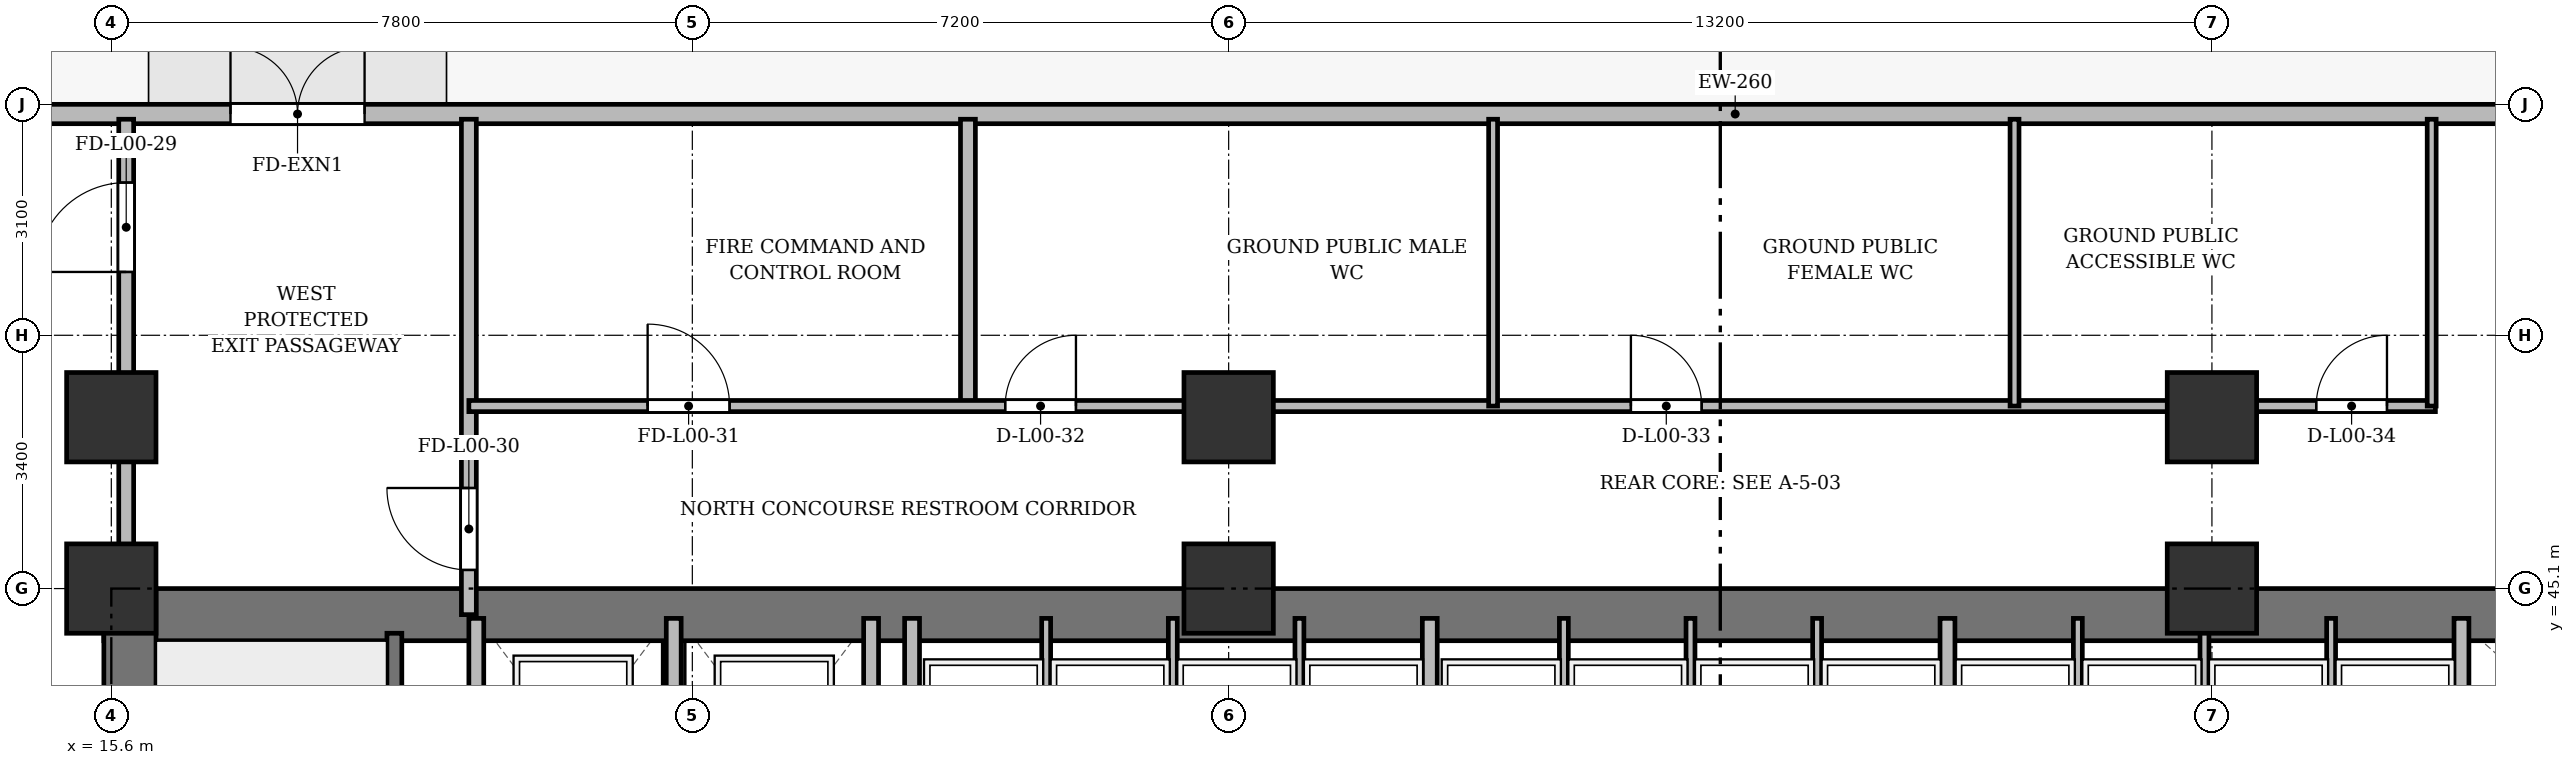
"""IFC4 building model, lengths in metres.
Left out: names, types, materials, properties, quantities, classifications, styles, units other than length and angle.
Written with IfcOpenShell. Run it as: python <this file> out.ifc"""

import sys

from ifc_helpers import new_model, si_unit, direction, frame, frame_2d, origin, origin_2d, place, context, subcontext, project, spatial, rectangle, extrude, source, transform, mapped, element, fill, save


model = new_model("IFC4")
c1 = context("Model", 3, precision=1e-05, world=origin(), true_north=direction((0.0, 1.0)))
c2 = subcontext(c1, "Body", "Model", "MODEL_VIEW")
j1 = project(units=[si_unit("LENGTHUNIT", "METRE"), si_unit("PLANEANGLEUNIT", "RADIAN")], contexts=[c1])
p1 = place(None, origin())
s1 = spatial("IfcSite", under=j1, at=p1, CompositionType="ELEMENT")
p2 = place(p1, origin())
s2 = spatial("IfcBuilding", under=s1, at=p2, CompositionType="ELEMENT")
p3 = place(p2, origin())
s3 = spatial("IfcBuildingStorey", under=s2, at=p3, CompositionType="ELEMENT", Elevation=0.0)
m1 = source(origin(), c2, "Body", "SweptSolid", [
    extrude(rectangle(XDim=1.2, YDim=1.2, at=origin_2d()), origin(), (0.0, 0.0, 1.0), 5.2),
])
for number, where, z_axis, x_axis in (
    (1, (15.6, 45.1, 0.0), (0.0, 0.0, 1.0), (1.0, 0.0, 0.0)),
    (2, (15.6, 47.4, 0.0), (0.0, 0.0, 1.0), (1.0, 0.0, 0.0)),
    (3, (30.6, 45.1, 0.0), (0.0, 0.0, 1.0), (1.0, 0.0, 0.0)),
    (4, (30.6, 47.4, 0.0), (0.0, 0.0, 1.0), (1.0, 0.0, 0.0)),
    (5, (43.8, 45.1, 0.0), (0.0, 0.0, 1.0), (1.0, 0.0, 0.0)),
    (6, (43.8, 47.4, 0.0), (0.0, 0.0, 1.0), (1.0, 0.0, 0.0)),
):
    element("IfcColumn", number, at=place(p3, frame(where, z_axis=z_axis, x_axis=x_axis)), inside=s3, PredefinedType="COLUMN", context=c2, shape_type="MappedRepresentation", body=[
        mapped(m1, transform((0.0, 0.0, 0.0), x_axis=(1.0, 0.0, 0.0), y_axis=(0.0, 1.0, 0.0), z_axis=(0.0, 0.0, 1.0), scale=1.0)),
    ])
p4 = place(p3, frame((-2.05, 51.47, 0.0), z_axis=(0.0, 0.0, 1.0), x_axis=(1.0, 0.0, 0.0)))
e7 = element("IfcWall", 7, at=p4, inside=s3, PredefinedType="SOLIDWALL", context=c2, shape_type="SweptSolid", body=[
    extrude(rectangle(XDim=78.5, YDim=0.26, at=frame_2d((39.25, 0.0))), origin(), (0.0, 0.0, 1.0), 4.88),
])
p5 = place(p4, frame((3.0, 0.0, 0.0)))
e8 = element("IfcOpeningElement", 8, at=p5, cuts=e7, PredefinedType="OPENING", context=c2, shape_type="SweptSolid", body=[
    extrude(rectangle(XDim=6.0, YDim=4.2, at=frame_2d((3.0, 2.1))), frame((0.0, 0.14, 0.0), z_axis=(0.0, -1.0, 0.0), x_axis=(1.0, 0.0, 0.0)), (0.0, 0.0, 1.0), 0.28),
])
p6 = place(p4, frame((19.25, 0.0, 0.0)))
e9 = element("IfcOpeningElement", 9, at=p6, cuts=e7, PredefinedType="OPENING", context=c2, shape_type="SweptSolid", body=[
    extrude(rectangle(XDim=1.8, YDim=2.3, at=frame_2d((0.9, 1.15))), frame((0.0, 0.14, 0.0), z_axis=(0.0, -1.0, 0.0), x_axis=(1.0, 0.0, 0.0)), (0.0, 0.0, 1.0), 0.28),
])
p7 = place(p4, frame((57.85, 0.0, 0.0)))
e10 = element("IfcOpeningElement", 10, at=p7, cuts=e7, PredefinedType="OPENING", context=c2, shape_type="SweptSolid", body=[
    extrude(rectangle(XDim=1.8, YDim=2.3, at=frame_2d((0.9, 1.15))), frame((0.0, 0.14, 0.0), z_axis=(0.0, -1.0, 0.0), x_axis=(1.0, 0.0, 0.0)), (0.0, 0.0, 1.0), 0.28),
])
p8 = place(p3, frame((15.5, 44.75, 0.0), z_axis=(0.0, 0.0, 1.0), x_axis=(1.0, 0.0, 0.0)))
e11 = element("IfcWall", 11, at=p8, inside=s3, PredefinedType="SHEAR", context=c2, shape_type="SweptSolid", body=[
    extrude(rectangle(XDim=43.4, YDim=0.7, at=frame_2d((21.7, 0.0))), origin(), (0.0, 0.0, 1.0), 4.88),
])
p9 = place(p3, frame((15.85, 33.4, 0.0), z_axis=(0.0, 0.0, 1.0), x_axis=(0.0, 1.0, 0.0)))
e12 = element("IfcWall", 12, at=p9, inside=s3, PredefinedType="SHEAR", context=c2, shape_type="SweptSolid", body=[
    extrude(rectangle(XDim=11.7, YDim=0.7, at=frame_2d((5.85, 0.0))), origin(), (0.0, 0.0, 1.0), 4.88),
])
p10 = place(p3, frame((19.4, 33.4, 0.0), z_axis=(0.0, 0.0, 1.0), x_axis=(0.0, 1.0, 0.0)))
e13 = element("IfcWall", 13, at=p10, inside=s3, PredefinedType="SHEAR", context=c2, shape_type="SweptSolid", body=[
    extrude(rectangle(XDim=11.1, YDim=0.2, at=frame_2d((5.55, 0.0))), origin(), (0.0, 0.0, 1.0), 4.88),
])
p11 = place(p10, frame((0.85, 0.0, 0.0)))
e14 = element("IfcOpeningElement", 14, at=p11, cuts=e13, PredefinedType="OPENING", context=c2, shape_type="SweptSolid", body=[
    extrude(rectangle(XDim=1.1, YDim=2.15, at=frame_2d((0.55, 1.075))), frame((0.0, 0.11, 0.0), z_axis=(0.0, -1.0, 0.0), x_axis=(1.0, 0.0, 0.0)), (0.0, 0.0, 1.0), 0.22),
])
for number, where, z_axis, x_axis in (
    (15, (20.5, 41.3, 0.0), (0.0, 0.0, 1.0), (0.0, 1.0, 0.0)),
    (16, (23.15, 41.3, 0.0), (0.0, 0.0, 1.0), (0.0, 1.0, 0.0)),
    (17, (25.8, 41.3, 0.0), (0.0, 0.0, 1.0), (0.0, 1.0, 0.0)),
):
    element("IfcWall", number, at=place(p3, frame(where, z_axis=z_axis, x_axis=x_axis)), inside=s3, PredefinedType="SOLIDWALL", context=c2, shape_type="SweptSolid", body=[
        extrude(rectangle(XDim=3.4, YDim=0.2, at=frame_2d((1.7, 0.0))), origin(), (0.0, 0.0, 1.0), 4.88),
    ])
p12 = place(p3, frame((26.35, 33.4, 0.0), z_axis=(0.0, 0.0, 1.0), x_axis=(0.0, 1.0, 0.0)))
e18 = element("IfcWall", 18, at=p12, inside=s3, PredefinedType="SOLIDWALL", context=c2, shape_type="SweptSolid", body=[
    extrude(rectangle(XDim=11.3, YDim=0.2, at=frame_2d((5.65, 0.0))), origin(), (0.0, 0.0, 1.0), 3.78),
])
p13 = place(p3, frame((33.3, 41.5, 0.0), z_axis=(0.0, 0.0, 1.0), x_axis=(0.0, 1.0, 0.0)))
e19 = element("IfcWall", 19, at=p13, inside=s3, PredefinedType="SOLIDWALL", context=c2, shape_type="SweptSolid", body=[
    extrude(rectangle(XDim=3.2, YDim=0.2, at=frame_2d((1.6, 0.0))), origin(), (0.0, 0.0, 1.0), 4.88),
])
for number, where, z_axis, x_axis in (
    (20, (28.15, 41.5, 0.0), (0.0, 0.0, 1.0), (0.0, 1.0, 0.0)),
    (21, (29.85, 41.5, 0.0), (0.0, 0.0, 1.0), (0.0, 1.0, 0.0)),
    (22, (31.55, 41.5, 0.0), (0.0, 0.0, 1.0), (0.0, 1.0, 0.0)),
    (23, (35.1, 41.5, 0.0), (0.0, 0.0, 1.0), (0.0, 1.0, 0.0)),
    (24, (36.8, 41.5, 0.0), (0.0, 0.0, 1.0), (0.0, 1.0, 0.0)),
    (25, (38.5, 41.5, 0.0), (0.0, 0.0, 1.0), (0.0, 1.0, 0.0)),
):
    element("IfcWall", number, at=place(p3, frame(where, z_axis=z_axis, x_axis=x_axis)), inside=s3, PredefinedType="PARTITIONING", context=c2, shape_type="SweptSolid", body=[
        extrude(rectangle(XDim=3.2, YDim=0.12, at=frame_2d((1.6, 0.0))), origin(), (0.0, 0.0, 1.0), 4.88),
    ])
p14 = place(p3, frame((40.25, 41.5, 0.0), z_axis=(0.0, 0.0, 1.0), x_axis=(0.0, 1.0, 0.0)))
e26 = element("IfcWall", 26, at=p14, inside=s3, PredefinedType="SOLIDWALL", context=c2, shape_type="SweptSolid", body=[
    extrude(rectangle(XDim=3.2, YDim=0.2, at=frame_2d((1.6, 0.0))), origin(), (0.0, 0.0, 1.0), 4.88),
])
p15 = place(p3, frame((42.0, 41.5, 0.0), z_axis=(0.0, 0.0, 1.0), x_axis=(0.0, 1.0, 0.0)))
e27 = element("IfcWall", 27, at=p15, inside=s3, PredefinedType="PARTITIONING", context=c2, shape_type="SweptSolid", body=[
    extrude(rectangle(XDim=3.2, YDim=0.12, at=frame_2d((1.6, 0.0))), origin(), (0.0, 0.0, 1.0), 4.88),
])
p16 = place(p3, frame((43.7, 41.5, 0.0), z_axis=(0.0, 0.0, 1.0), x_axis=(0.0, 1.0, 0.0)))
e28 = element("IfcWall", 28, at=p16, inside=s3, PredefinedType="PARTITIONING", context=c2, shape_type="SweptSolid", body=[
    extrude(rectangle(XDim=3.2, YDim=0.12, at=frame_2d((1.6, 0.0))), origin(), (0.0, 0.0, 1.0), 4.08),
])
p17 = place(p3, frame((45.4, 41.5, 0.0), z_axis=(0.0, 0.0, 1.0), x_axis=(0.0, 1.0, 0.0)))
e29 = element("IfcWall", 29, at=p17, inside=s3, PredefinedType="PARTITIONING", context=c2, shape_type="SweptSolid", body=[
    extrude(rectangle(XDim=3.2, YDim=0.12, at=frame_2d((1.6, 0.0))), origin(), (0.0, 0.0, 1.0), 4.88),
])
p18 = place(p3, frame((47.15, 33.4, 0.0), z_axis=(0.0, 0.0, 1.0), x_axis=(0.0, 1.0, 0.0)))
e30 = element("IfcWall", 30, at=p18, inside=s3, PredefinedType="SOLIDWALL", context=c2, shape_type="SweptSolid", body=[
    extrude(rectangle(XDim=11.3, YDim=0.2, at=frame_2d((5.65, 0.0))), origin(), (0.0, 0.0, 1.0), 3.78),
])
p19 = place(p3, frame((15.8, 44.75, 0.0), z_axis=(0.0, 0.0, 1.0), x_axis=(0.0, 1.0, 0.0)))
e31 = element("IfcWall", 31, at=p19, inside=s3, PredefinedType="PARTITIONING", context=c2, shape_type="SweptSolid", body=[
    extrude(rectangle(XDim=6.65, YDim=0.2, at=frame_2d((3.325, 0.0))), origin(), (0.0, 0.0, 1.0), 3.78),
])
p20 = place(p19, frame((4.6, 0.0, 0.0)))
e32 = element("IfcOpeningElement", 32, at=p20, cuts=e31, PredefinedType="OPENING", context=c2, shape_type="SweptSolid", body=[
    extrude(rectangle(XDim=1.2, YDim=2.15, at=frame_2d((0.6, 1.075))), frame((0.0, 0.11, 0.0), z_axis=(0.0, -1.0, 0.0), x_axis=(1.0, 0.0, 0.0)), (0.0, 0.0, 1.0), 0.22),
])
p21 = place(p3, frame((20.4, 44.75, 0.0), z_axis=(0.0, 0.0, 1.0), x_axis=(0.0, 1.0, 0.0)))
e33 = element("IfcWall", 33, at=p21, inside=s3, PredefinedType="PARTITIONING", context=c2, shape_type="SweptSolid", body=[
    extrude(rectangle(XDim=6.65, YDim=0.2, at=frame_2d((3.325, 0.0))), origin(), (0.0, 0.0, 1.0), 3.78),
])
p22 = place(p21, frame((0.6, 0.0, 0.0)))
e34 = element("IfcOpeningElement", 34, at=p22, cuts=e33, PredefinedType="OPENING", context=c2, shape_type="SweptSolid", body=[
    extrude(rectangle(XDim=1.1, YDim=2.15, at=frame_2d((0.55, 1.075))), frame((0.0, 0.11, 0.0), z_axis=(0.0, -1.0, 0.0), x_axis=(1.0, 0.0, 0.0)), (0.0, 0.0, 1.0), 0.22),
])
p23 = place(p3, frame((27.1, 47.55, 0.0), z_axis=(0.0, 0.0, 1.0), x_axis=(0.0, 1.0, 0.0)))
e35 = element("IfcWall", 35, at=p23, inside=s3, PredefinedType="PARTITIONING", context=c2, shape_type="SweptSolid", body=[
    extrude(rectangle(XDim=3.85, YDim=0.2, at=frame_2d((1.925, 0.0))), origin(), (0.0, 0.0, 1.0), 3.78),
])
p24 = place(p3, frame((20.4, 47.55, 0.0), z_axis=(0.0, 0.0, 1.0), x_axis=(1.0, 0.0, 0.0)))
e36 = element("IfcWall", 36, at=p24, inside=s3, PredefinedType="PARTITIONING", context=c2, shape_type="SweptSolid", body=[
    extrude(rectangle(XDim=26.4, YDim=0.15, at=frame_2d((13.2, 0.0))), origin(), (0.0, 0.0, 1.0), 3.78),
])
p25 = place(p24, frame((2.4, 0.0, 0.0)))
e37 = element("IfcOpeningElement", 37, at=p25, cuts=e36, PredefinedType="OPENING", context=c2, shape_type="SweptSolid", body=[
    extrude(rectangle(XDim=1.1, YDim=2.15, at=frame_2d((0.55, 1.075))), frame((0.0, 0.085, 0.0), z_axis=(0.0, -1.0, 0.0), x_axis=(1.0, 0.0, 0.0)), (0.0, 0.0, 1.0), 0.17),
])
p26 = place(p24, frame((7.2, 0.0, 0.0)))
e38 = element("IfcOpeningElement", 38, at=p26, cuts=e36, PredefinedType="OPENING", context=c2, shape_type="SweptSolid", body=[
    extrude(rectangle(XDim=0.95, YDim=2.15, at=frame_2d((0.475, 1.075))), frame((0.0, 0.085, 0.0), z_axis=(0.0, -1.0, 0.0), x_axis=(1.0, 0.0, 0.0)), (0.0, 0.0, 1.0), 0.17),
])
p27 = place(p24, frame((15.6, 0.0, 0.0)))
e39 = element("IfcOpeningElement", 39, at=p27, cuts=e36, PredefinedType="OPENING", context=c2, shape_type="SweptSolid", body=[
    extrude(rectangle(XDim=0.95, YDim=2.15, at=frame_2d((0.475, 1.075))), frame((0.0, 0.085, 0.0), z_axis=(0.0, -1.0, 0.0), x_axis=(1.0, 0.0, 0.0)), (0.0, 0.0, 1.0), 0.17),
])
p28 = place(p24, frame((24.8, 0.0, 0.0)))
e40 = element("IfcOpeningElement", 40, at=p28, cuts=e36, PredefinedType="OPENING", context=c2, shape_type="SweptSolid", body=[
    extrude(rectangle(XDim=0.95, YDim=2.15, at=frame_2d((0.475, 1.075))), frame((0.0, 0.085, 0.0), z_axis=(0.0, -1.0, 0.0), x_axis=(1.0, 0.0, 0.0)), (0.0, 0.0, 1.0), 0.17),
])
for number, where, z_axis, x_axis in (
    (41, (34.15, 47.55, 0.0), (0.0, 0.0, 1.0), (0.0, 1.0, 0.0)),
    (42, (41.15, 47.55, 0.0), (0.0, 0.0, 1.0), (0.0, 1.0, 0.0)),
    (43, (46.75, 47.55, 0.0), (0.0, 0.0, 1.0), (0.0, 1.0, 0.0)),
):
    element("IfcWall", number, at=place(p3, frame(where, z_axis=z_axis, x_axis=x_axis)), inside=s3, PredefinedType="PARTITIONING", context=c2, shape_type="SweptSolid", body=[
        extrude(rectangle(XDim=3.85, YDim=0.12, at=frame_2d((1.925, 0.0))), origin(), (0.0, 0.0, 1.0), 3.78),
    ])
m2 = source(origin(), c2, "Body", "SweptSolid", [
    extrude(rectangle(XDim=1.8, YDim=2.3, at=frame_2d((0.9, 1.15))), frame((0.0, 0.025, 0.0), z_axis=(0.0, -1.0, 0.0), x_axis=(1.0, 0.0, 0.0)), (0.0, 0.0, 1.0), 0.05),
])
p29 = place(p6, origin())
e44 = element("IfcDoor", 44, at=p29, inside=s3, OperationType="DOUBLE_DOOR_SINGLE_SWING", PredefinedType="DOOR", context=c2, shape_type="MappedRepresentation", body=[
    mapped(m2, transform((0.0, 0.0, 0.0), x_axis=(1.0, 0.0, 0.0), y_axis=(0.0, 1.0, 0.0), z_axis=(0.0, 0.0, 1.0), scale=1.0)),
])
fill(e9, e44)
m3 = source(origin(), c2, "Body", "SweptSolid", [
    extrude(rectangle(XDim=1.2, YDim=2.15, at=frame_2d((0.6, 1.075))), frame((0.0, 0.025, 0.0), z_axis=(0.0, -1.0, 0.0), x_axis=(1.0, 0.0, 0.0)), (0.0, 0.0, 1.0), 0.05),
])
p30 = place(p20, origin())
e45 = element("IfcDoor", 45, at=p30, inside=s3, OperationType="SINGLE_SWING_LEFT", PredefinedType="DOOR", context=c2, shape_type="MappedRepresentation", body=[
    mapped(m3, transform((0.0, 0.0, 0.0), x_axis=(1.0, 0.0, 0.0), y_axis=(0.0, 1.0, 0.0), z_axis=(0.0, 0.0, 1.0), scale=1.0)),
])
fill(e32, e45)
m4 = source(origin(), c2, "Body", "SweptSolid", [
    extrude(rectangle(XDim=1.1, YDim=2.15, at=frame_2d((0.55, 1.075))), frame((0.0, 0.025, 0.0), z_axis=(0.0, -1.0, 0.0), x_axis=(1.0, 0.0, 0.0)), (0.0, 0.0, 1.0), 0.05),
])
p31 = place(p22, origin())
e46 = element("IfcDoor", 46, at=p31, inside=s3, OperationType="SINGLE_SWING_RIGHT", PredefinedType="DOOR", context=c2, shape_type="MappedRepresentation", body=[
    mapped(m4, transform((0.0, 0.0, 0.0), x_axis=(1.0, 0.0, 0.0), y_axis=(0.0, 1.0, 0.0), z_axis=(0.0, 0.0, 1.0), scale=1.0)),
])
fill(e34, e46)
p32 = place(p25, origin())
e47 = element("IfcDoor", 47, at=p32, inside=s3, OperationType="SINGLE_SWING_LEFT", PredefinedType="DOOR", context=c2, shape_type="MappedRepresentation", body=[
    mapped(m4, transform((0.0, 0.0, 0.0), x_axis=(1.0, 0.0, 0.0), y_axis=(0.0, 1.0, 0.0), z_axis=(0.0, 0.0, 1.0), scale=1.0)),
])
fill(e37, e47)
m5 = source(origin(), c2, "Body", "SweptSolid", [
    extrude(rectangle(XDim=0.95, YDim=2.15, at=frame_2d((0.475, 1.075))), frame((0.0, 0.025, 0.0), z_axis=(0.0, -1.0, 0.0), x_axis=(1.0, 0.0, 0.0)), (0.0, 0.0, 1.0), 0.05),
])
p33 = place(p26, origin())
e48 = element("IfcDoor", 48, at=p33, inside=s3, OperationType="SINGLE_SWING_RIGHT", PredefinedType="DOOR", context=c2, shape_type="MappedRepresentation", body=[
    mapped(m5, transform((0.0, 0.0, 0.0), x_axis=(1.0, 0.0, 0.0), y_axis=(0.0, 1.0, 0.0), z_axis=(0.0, 0.0, 1.0), scale=1.0)),
])
fill(e38, e48)
p34 = place(p27, origin())
e49 = element("IfcDoor", 49, at=p34, inside=s3, OperationType="SINGLE_SWING_LEFT", PredefinedType="DOOR", context=c2, shape_type="MappedRepresentation", body=[
    mapped(m5, transform((0.0, 0.0, 0.0), x_axis=(1.0, 0.0, 0.0), y_axis=(0.0, 1.0, 0.0), z_axis=(0.0, 0.0, 1.0), scale=1.0)),
])
fill(e39, e49)
p35 = place(p28, origin())
e50 = element("IfcDoor", 50, at=p35, inside=s3, OperationType="SINGLE_SWING_RIGHT", PredefinedType="DOOR", context=c2, shape_type="MappedRepresentation", body=[
    mapped(m5, transform((0.0, 0.0, 0.0), x_axis=(1.0, 0.0, 0.0), y_axis=(0.0, 1.0, 0.0), z_axis=(0.0, 0.0, 1.0), scale=1.0)),
])
fill(e40, e50)
save(model, sys.argv[1])
